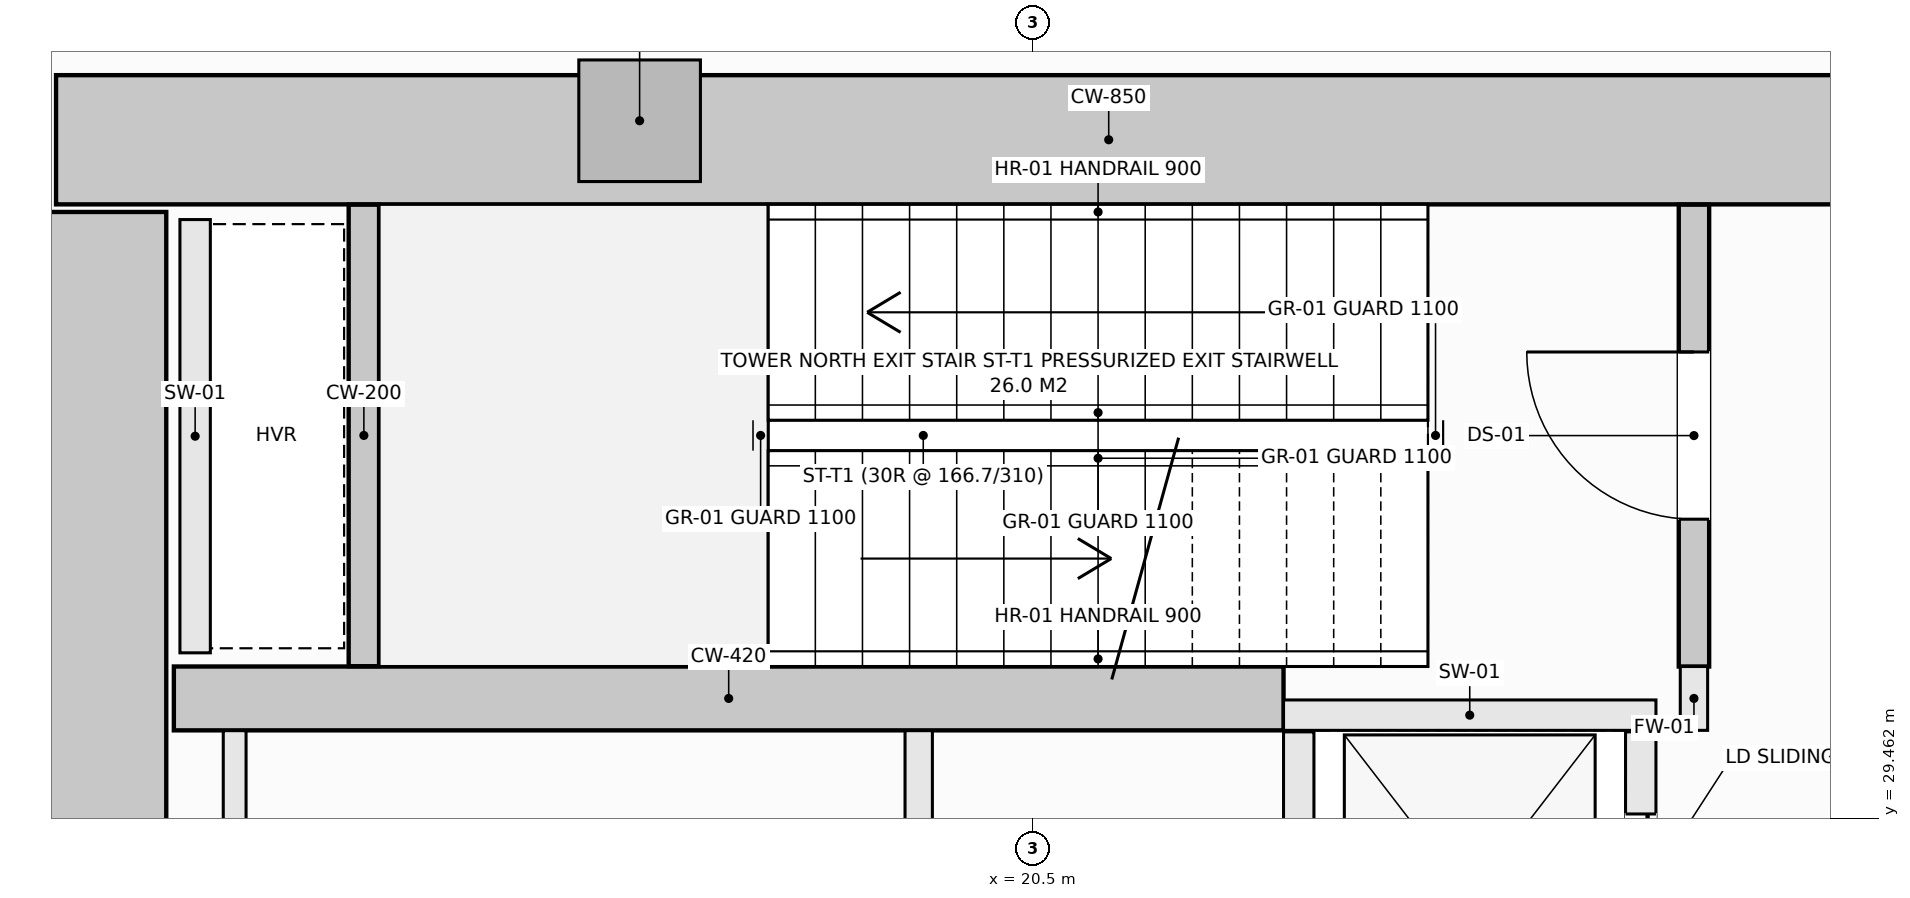
"""IFC4 building model, lengths in metres.
Left out: names, types, materials, properties, quantities, classifications, styles, units other than length and angle.
Written with IfcOpenShell. Run it as: python <this file> out.ifc"""

import sys

from ifc_helpers import new_model, si_unit, direction, frame, frame_2d, origin, origin_2d, place, context, subcontext, project, spatial, rectangle, extrude, element, fill, save


model = new_model("IFC4")
c1 = context("Model", 3, precision=1e-05, world=origin(), true_north=direction((0.0, 1.0)))
c2 = subcontext(c1, "Body", "Model", "MODEL_VIEW")
j1 = project(units=[si_unit("LENGTHUNIT", "METRE"), si_unit("PLANEANGLEUNIT", "RADIAN")], contexts=[c1])
p1 = place(None, origin())
s1 = spatial("IfcSite", under=j1, at=p1, CompositionType="ELEMENT")
p2 = place(p1, origin())
s2 = spatial("IfcBuilding", under=s1, at=p2, CompositionType="ELEMENT")
p3 = place(p2, origin())
s3 = spatial("IfcBuildingStorey", under=s2, at=p3, CompositionType="ELEMENT", Elevation=0.0)
p4 = place(p3, frame((14.075, 33.925, -0.36), z_axis=(0.0, 0.0, 1.0), x_axis=(1.0, 0.0, 0.0)))
e1 = element("IfcWall", 1, at=p4, inside=s3, PredefinedType="SHEAR", context=c2, shape_type="SweptSolid", body=[
    extrude(rectangle(XDim=13.85, YDim=0.85, at=frame_2d((6.925, 0.0))), origin(), (0.0, 0.0, 1.0), 5.1),
])
p5 = place(p3, frame((14.375, 20.55, -0.36), z_axis=(0.0, 0.0, 1.0), x_axis=(0.0, 1.0, 0.0)))
e2 = element("IfcWall", 2, at=p5, inside=s3, PredefinedType="SHEAR", context=c2, shape_type="SweptSolid", body=[
    extrude(rectangle(XDim=12.9, YDim=0.85, at=frame_2d((6.45, 0.0))), origin(), (0.0, 0.0, 1.0), 5.1),
])
p6 = place(p3, frame((14.85, 30.25, -0.36), z_axis=(0.0, 0.0, 1.0), x_axis=(1.0, 0.0, 0.0)))
e3 = element("IfcWall", 3, at=p6, inside=s3, PredefinedType="SHEAR", context=c2, shape_type="SweptSolid", body=[
    extrude(rectangle(XDim=7.3, YDim=0.42, at=frame_2d((3.65, 0.0))), origin(), (0.0, 0.0, 1.0), 5.1),
])
p7 = place(p3, frame((17.914, 34.05, -0.36), z_axis=(0.0, 0.0, 1.0), x_axis=(1.0, 0.0, 0.0)))
e4 = element("IfcColumn", 4, at=p7, inside=s3, PredefinedType="PILASTER", context=c2, shape_type="SweptSolid", body=[
    extrude(rectangle(XDim=0.8, YDim=0.8, at=origin_2d()), origin(), (0.0, 0.0, 1.0), 5.1),
])
p8 = place(p3, frame((24.85, 30.46, -0.36), z_axis=(0.0, 0.0, 1.0), x_axis=(0.0, 1.0, 0.0)))
e5 = element("IfcWall", 5, at=p8, inside=s3, PredefinedType="SHEAR", context=c2, shape_type="SweptSolid", body=[
    extrude(rectangle(XDim=3.038, YDim=0.2, at=frame_2d((1.519, 0.0))), origin(), (0.0, 0.0, 1.0), 5.1),
])
p9 = place(p8, frame((0.969, 0.0, 0.36)))
e6 = element("IfcOpeningElement", 6, at=p9, cuts=e5, PredefinedType="OPENING", context=c2, shape_type="SweptSolid", body=[
    extrude(rectangle(XDim=1.1, YDim=2.15, at=frame_2d((0.55, 1.075))), frame((0.0, 0.11, 0.0), z_axis=(0.0, -1.0, 0.0), x_axis=(1.0, 0.0, 0.0)), (0.0, 0.0, 1.0), 0.22),
])
p10 = place(p3, frame((16.1, 30.462, -0.36), z_axis=(0.0, 0.0, 1.0), x_axis=(0.0, 1.0, 0.0)))
e7 = element("IfcWall", 7, at=p10, inside=s3, PredefinedType="SHEAR", context=c2, shape_type="SweptSolid", body=[
    extrude(rectangle(XDim=3.036, YDim=0.2, at=frame_2d((1.518, 0.0))), origin(), (0.0, 0.0, 1.0), 5.1),
])
p11 = place(p3, frame((22.15, 30.14, 0.0), z_axis=(0.0, 0.0, 1.0), x_axis=(1.0, 0.0, 0.0)))
e8 = element("IfcWall", 8, at=p11, inside=s3, PredefinedType="SOLIDWALL", context=c2, shape_type="SweptSolid", body=[
    extrude(rectangle(XDim=2.45, YDim=0.2, at=frame_2d((1.225, 0.0))), origin(), (0.0, 0.0, 1.0), 4.74),
])
p12 = place(p3, frame((22.25, 27.85, 0.0), z_axis=(0.0, 0.0, 1.0), x_axis=(0.0, 1.0, 0.0)))
e9 = element("IfcWall", 9, at=p12, inside=s3, PredefinedType="SOLIDWALL", context=c2, shape_type="SweptSolid", body=[
    extrude(rectangle(XDim=2.18, YDim=0.2, at=frame_2d((1.09, 0.0))), origin(), (0.0, 0.0, 1.0), 4.74),
])
p13 = place(p3, frame((24.5, 27.85, 0.0), z_axis=(0.0, 0.0, 1.0), x_axis=(0.0, 1.0, 0.0)))
e10 = element("IfcWall", 10, at=p13, inside=s3, PredefinedType="SOLIDWALL", context=c2, shape_type="SweptSolid", body=[
    extrude(rectangle(XDim=2.18, YDim=0.2, at=frame_2d((1.09, 0.0))), origin(), (0.0, 0.0, 1.0), 4.74),
])
p14 = place(p13, frame((0.54, 0.0, 0.0)))
e11 = element("IfcOpeningElement", 11, at=p14, cuts=e10, PredefinedType="OPENING", context=c2, shape_type="SweptSolid", body=[
    extrude(rectangle(XDim=1.1, YDim=2.2, at=frame_2d((0.55, 1.1))), frame((0.0, 0.11, 0.0), z_axis=(0.0, -1.0, 0.0), x_axis=(1.0, 0.0, 0.0)), (0.0, 0.0, 1.0), 0.22),
])
p15 = place(p3, frame((14.99, 30.55, 0.0), z_axis=(0.0, 0.0, 1.0), x_axis=(0.0, 1.0, 0.0)))
e12 = element("IfcWall", 12, at=p15, inside=s3, PredefinedType="SOLIDWALL", context=c2, shape_type="SweptSolid", body=[
    extrude(rectangle(XDim=2.85, YDim=0.2, at=frame_2d((1.425, 0.0))), origin(), (0.0, 0.0, 1.0), 4.74),
])
p16 = place(p3, frame((24.85, 30.04, 0.0), z_axis=(0.0, 0.0, 1.0), x_axis=(0.0, 1.0, 0.0)))
e13 = element("IfcWall", 13, at=p16, inside=s3, PredefinedType="SOLIDWALL", context=c2, shape_type="SweptSolid", body=[
    extrude(rectangle(XDim=0.42, YDim=0.18, at=frame_2d((0.21, 0.0))), origin(), (0.0, 0.0, 1.0), 4.74),
])
p17 = place(p3, frame((15.25, 27.932, 0.0), z_axis=(0.0, 0.0, 1.0), x_axis=(0.0, 1.0, 0.0)))
e14 = element("IfcWall", 14, at=p17, inside=s3, PredefinedType="PARTITIONING", context=c2, shape_type="SweptSolid", body=[
    extrude(rectangle(XDim=2.106, YDim=0.15, at=frame_2d((1.053, 0.0))), origin(), (0.0, 0.0, 1.0), 4.74),
])
p18 = place(p3, frame((19.75, 27.932, 0.0), z_axis=(0.0, 0.0, 1.0), x_axis=(0.0, 1.0, 0.0)))
e15 = element("IfcWall", 15, at=p18, inside=s3, PredefinedType="SOLIDWALL", context=c2, shape_type="SweptSolid", body=[
    extrude(rectangle(XDim=2.106, YDim=0.18, at=frame_2d((1.053, 0.0))), origin(), (0.0, 0.0, 1.0), 4.74),
])
p19 = place(p9, origin())
e16 = element("IfcDoor", 16, at=p19, inside=s3, OperationType="SINGLE_SWING_RIGHT", PredefinedType="DOOR", context=c2, shape_type="SweptSolid", body=[
    extrude(rectangle(XDim=1.1, YDim=2.15, at=frame_2d((0.55, 1.075))), frame((0.0, 0.025, 0.0), z_axis=(0.0, -1.0, 0.0), x_axis=(1.0, 0.0, 0.0)), (0.0, 0.0, 1.0), 0.05),
])
fill(e6, e16)
p20 = place(p14, origin())
e17 = element("IfcDoor", 17, at=p20, inside=s3, OperationType="SLIDING_TO_LEFT", PredefinedType="DOOR", context=c2, shape_type="SweptSolid", body=[
    extrude(rectangle(XDim=1.1, YDim=2.2, at=frame_2d((0.55, 1.1))), frame((0.0, 0.025, 0.0), z_axis=(0.0, -1.0, 0.0), x_axis=(1.0, 0.0, 0.0)), (0.0, 0.0, 1.0), 0.05),
])
fill(e11, e17)
save(model, sys.argv[1])
